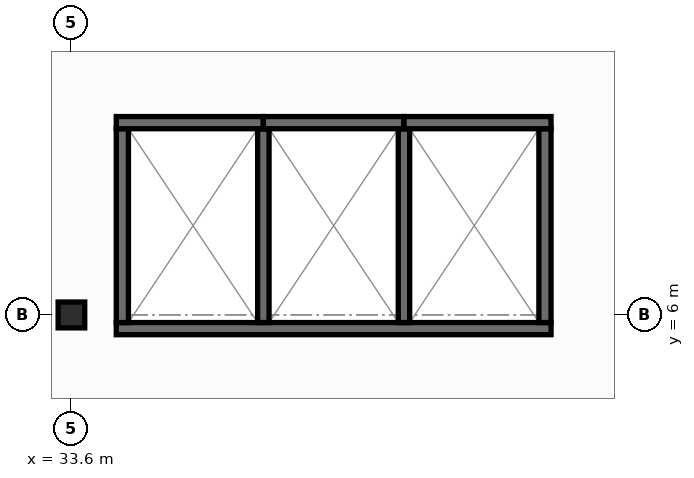
"""IFC4 building model, lengths in metres.
Left out: names, types, materials, properties, quantities, classifications, styles, units other than length and angle.
Written with IfcOpenShell. Run it as: python <this file> out.ifc"""

import sys

from ifc_helpers import new_model, si_unit, direction, frame, frame_2d, origin, origin_2d, place, context, subcontext, project, spatial, rectangle, i_section, extrude, element, save


model = new_model("IFC4")
c1 = context("Model", 3, precision=1e-05, world=origin(), true_north=direction((0.0, 1.0)))
c2 = subcontext(c1, "Body", "Model", "MODEL_VIEW")
j1 = project(units=[si_unit("LENGTHUNIT", "METRE"), si_unit("PLANEANGLEUNIT", "RADIAN")], contexts=[c1])
p1 = place(None, origin())
s1 = spatial("IfcSite", under=j1, at=p1, CompositionType="ELEMENT")
p2 = place(p1, origin())
s2 = spatial("IfcBuilding", under=s1, at=p2, CompositionType="ELEMENT")
p3 = place(p2, frame((0.0, 0.0, 30.4)))
s3 = spatial("IfcBuildingStorey", under=s2, at=p3, CompositionType="ELEMENT", Elevation=30.4)
p4 = place(p3, frame((33.6, 6.0, 0.0), z_axis=(0.0, 0.0, 1.0), x_axis=(1.0, 0.0, 0.0)))
e1 = element("IfcColumn", 1, at=p4, inside=s3, PredefinedType="COLUMN", context=c2, shape_type="SweptSolid", body=[
    extrude(i_section(OverallWidth=0.35, OverallDepth=0.34, WebThickness=0.016, FlangeThickness=0.028, at=origin_2d()), origin(), (0.0, 0.0, 1.0), 3.95),
])
p5 = place(p3, frame((34.19, 5.82, 0.0), z_axis=(0.0, 0.0, 1.0), x_axis=(1.0, 0.0, 0.0)))
e2 = element("IfcWall", 2, at=p5, inside=s3, PredefinedType="SHEAR", context=c2, shape_type="SweptSolid", body=[
    extrude(rectangle(XDim=5.72, YDim=0.16, at=frame_2d((2.86, 0.0))), origin(), (0.0, 0.0, 1.0), 3.71),
])
for number, where, z_axis, x_axis in (
    (3, (34.27, 5.9, 0.0), (0.0, 0.0, 1.0), (0.0, 1.0, 0.0)),
    (4, (39.83, 5.9, 0.0), (0.0, 0.0, 1.0), (0.0, 1.0, 0.0)),
):
    element("IfcWall", number, at=place(p3, frame(where, z_axis=z_axis, x_axis=x_axis)), inside=s3, PredefinedType="SHEAR", context=c2, shape_type="SweptSolid", body=[
        extrude(rectangle(XDim=2.55, YDim=0.16, at=frame_2d((1.275, 0.0))), origin(), (0.0, 0.0, 1.0), 3.71),
    ])
for number, where, z_axis, x_axis in (
    (5, (36.125, 5.9, 0.0), (0.0, 0.0, 1.0), (0.0, 1.0, 0.0)),
    (6, (37.975, 5.9, 0.0), (0.0, 0.0, 1.0), (0.0, 1.0, 0.0)),
):
    element("IfcWall", number, at=place(p3, frame(where, z_axis=z_axis, x_axis=x_axis)), inside=s3, PredefinedType="SHEAR", context=c2, shape_type="SweptSolid", body=[
        extrude(rectangle(XDim=2.55, YDim=0.15, at=frame_2d((1.275, 0.0))), origin(), (0.0, 0.0, 1.0), 3.71),
    ])
p6 = place(p3, frame((34.19, 8.53, 0.0), z_axis=(0.0, 0.0, 1.0), x_axis=(1.0, 0.0, 0.0)))
e7 = element("IfcWall", 7, at=p6, inside=s3, PredefinedType="SHEAR", context=c2, shape_type="SweptSolid", body=[
    extrude(rectangle(XDim=1.935, YDim=0.16, at=frame_2d((0.968, 0.0))), origin(), (0.0, 0.0, 1.0), 3.71),
])
p7 = place(p3, frame((36.125, 8.53, 0.0), z_axis=(0.0, 0.0, 1.0), x_axis=(1.0, 0.0, 0.0)))
e8 = element("IfcWall", 8, at=p7, inside=s3, PredefinedType="SHEAR", context=c2, shape_type="SweptSolid", body=[
    extrude(rectangle(XDim=1.85, YDim=0.16, at=frame_2d((0.925, 0.0))), origin(), (0.0, 0.0, 1.0), 3.71),
])
p8 = place(p3, frame((37.975, 8.53, 0.0), z_axis=(0.0, 0.0, 1.0), x_axis=(1.0, 0.0, 0.0)))
e9 = element("IfcWall", 9, at=p8, inside=s3, PredefinedType="SHEAR", context=c2, shape_type="SweptSolid", body=[
    extrude(rectangle(XDim=1.935, YDim=0.16, at=frame_2d((0.967, 0.0))), origin(), (0.0, 0.0, 1.0), 3.71),
])
save(model, sys.argv[1])
